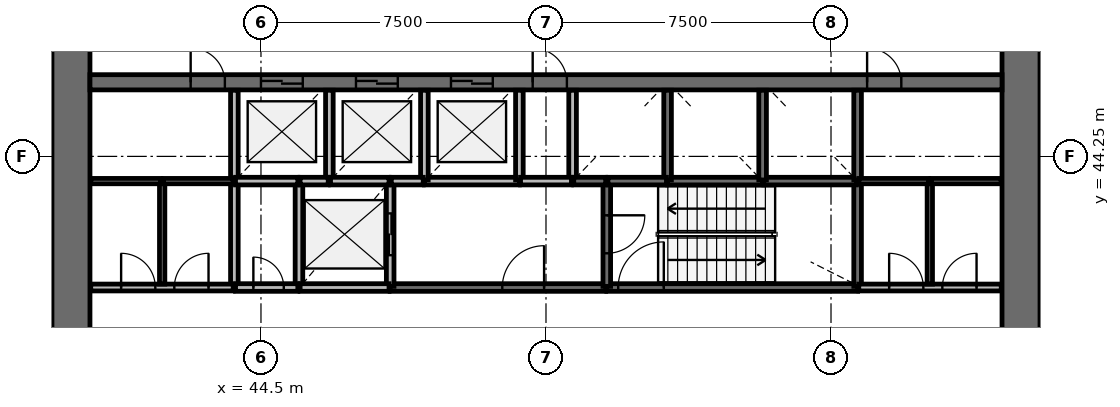
"""IFC4 building model, lengths in metres.
Left out: names, types, materials, properties, quantities, classifications, styles, units other than length and angle.
Written with IfcOpenShell. Run it as: python <this file> out.ifc"""

import sys

from ifc_helpers import new_model, si_unit, direction, frame, frame_2d, origin, place, context, subcontext, project, spatial, rectangle, extrude, source, transform, mapped, element, fill, save


model = new_model("IFC4")
c1 = context("Model", 3, precision=1e-05, world=origin(), true_north=direction((0.0, 1.0)))
c2 = subcontext(c1, "Body", "Model", "MODEL_VIEW")
j1 = project(units=[si_unit("LENGTHUNIT", "METRE"), si_unit("PLANEANGLEUNIT", "RADIAN")], contexts=[c1])
p1 = place(None, origin())
s1 = spatial("IfcSite", under=j1, at=p1, CompositionType="ELEMENT")
p2 = place(p1, origin())
s2 = spatial("IfcBuilding", under=s1, at=p2, CompositionType="ELEMENT")
p3 = place(p2, frame((0.0, 0.0, 13.8)))
s3 = spatial("IfcBuildingStorey", under=s2, at=p3, CompositionType="ELEMENT", Elevation=13.8)
p4 = place(p3, frame((64.5, 38.0, 0.0), z_axis=(0.0, 0.0, 1.0), x_axis=(0.0, 1.0, 0.0)))
e1 = element("IfcWall", 1, at=p4, inside=s3, PredefinedType="SHEAR", context=c2, shape_type="SweptSolid", body=[
    extrude(rectangle(XDim=20.0, YDim=1.0, at=frame_2d((10.0, 0.0))), origin(), (0.0, 0.0, 1.0), 4.4),
])
p5 = place(p4, frame((9.1, 0.0, 0.0)))
e2 = element("IfcOpeningElement", 2, at=p5, cuts=e1, PredefinedType="OPENING", context=c2, shape_type="SweptSolid", body=[
    extrude(rectangle(XDim=1.8, YDim=2.1, at=frame_2d((0.9, 1.05))), frame((0.0, 0.51, 0.0), z_axis=(0.0, -1.0, 0.0), x_axis=(1.0, 0.0, 0.0)), (0.0, 0.0, 1.0), 1.02),
])
p6 = place(p3, frame((39.5, 58.0, 0.0), z_axis=(0.0, 0.0, 1.0), x_axis=(0.0, -1.0, 0.0)))
e3 = element("IfcWall", 3, at=p6, inside=s3, PredefinedType="SHEAR", context=c2, shape_type="SweptSolid", body=[
    extrude(rectangle(XDim=20.0, YDim=1.0, at=frame_2d((10.0, 0.0))), origin(), (0.0, 0.0, 1.0), 4.4),
])
p7 = place(p6, frame((9.1, 0.0, 0.0)))
e4 = element("IfcOpeningElement", 4, at=p7, cuts=e3, PredefinedType="OPENING", context=c2, shape_type="SweptSolid", body=[
    extrude(rectangle(XDim=1.8, YDim=2.1, at=frame_2d((0.9, 1.05))), frame((0.0, 0.51, 0.0), z_axis=(0.0, -1.0, 0.0), x_axis=(1.0, 0.0, 0.0)), (0.0, 0.0, 1.0), 1.02),
])
p8 = place(p3, frame((40.0, 46.2, 0.0), z_axis=(0.0, 0.0, 1.0), x_axis=(1.0, 0.0, 0.0)))
e5 = element("IfcWall", 5, at=p8, inside=s3, PredefinedType="SHEAR", context=c2, shape_type="SweptSolid", body=[
    extrude(rectangle(XDim=24.0, YDim=0.4, at=frame_2d((12.0, 0.0))), origin(), (0.0, 0.0, 1.0), 4.4),
])
p9 = place(p8, frame((4.5, 0.0, 0.0)))
e6 = element("IfcOpeningElement", 6, at=p9, cuts=e5, PredefinedType="OPENING", context=c2, shape_type="SweptSolid", body=[
    extrude(rectangle(XDim=1.1, YDim=2.1, at=frame_2d((0.55, 1.05))), frame((0.0, 0.21, 0.0), z_axis=(0.0, -1.0, 0.0), x_axis=(1.0, 0.0, 0.0)), (0.0, 0.0, 1.0), 0.42),
])
p10 = place(p8, frame((7.0, 0.0, 0.0)))
e7 = element("IfcOpeningElement", 7, at=p10, cuts=e5, PredefinedType="OPENING", context=c2, shape_type="SweptSolid", body=[
    extrude(rectangle(XDim=1.1, YDim=2.1, at=frame_2d((0.55, 1.05))), frame((0.0, 0.21, 0.0), z_axis=(0.0, -1.0, 0.0), x_axis=(1.0, 0.0, 0.0)), (0.0, 0.0, 1.0), 0.42),
])
p11 = place(p8, frame((9.5, 0.0, 0.0)))
e8 = element("IfcOpeningElement", 8, at=p11, cuts=e5, PredefinedType="OPENING", context=c2, shape_type="SweptSolid", body=[
    extrude(rectangle(XDim=1.1, YDim=2.1, at=frame_2d((0.55, 1.05))), frame((0.0, 0.21, 0.0), z_axis=(0.0, -1.0, 0.0), x_axis=(1.0, 0.0, 0.0)), (0.0, 0.0, 1.0), 0.42),
])
p12 = place(p8, frame((20.45, 0.0, 0.0)))
e9 = element("IfcOpeningElement", 9, at=p12, cuts=e5, PredefinedType="OPENING", context=c2, shape_type="SweptSolid", body=[
    extrude(rectangle(XDim=0.9, YDim=2.1, at=frame_2d((0.45, 1.05))), frame((0.0, 0.21, 0.0), z_axis=(0.0, -1.0, 0.0), x_axis=(1.0, 0.0, 0.0)), (0.0, 0.0, 1.0), 0.42),
])
p13 = place(p8, frame((2.65, 0.0, 0.0)))
e10 = element("IfcOpeningElement", 10, at=p13, cuts=e5, PredefinedType="OPENING", context=c2, shape_type="SweptSolid", body=[
    extrude(rectangle(XDim=0.9, YDim=2.1, at=frame_2d((0.45, 1.05))), frame((0.0, 0.21, 0.0), z_axis=(0.0, -1.0, 0.0), x_axis=(1.0, 0.0, 0.0)), (0.0, 0.0, 1.0), 0.42),
])
p14 = place(p8, frame((11.65, 0.0, 0.0)))
e11 = element("IfcOpeningElement", 11, at=p14, cuts=e5, PredefinedType="OPENING", context=c2, shape_type="SweptSolid", body=[
    extrude(rectangle(XDim=0.9, YDim=2.1, at=frame_2d((0.45, 1.05))), frame((0.0, 0.21, 0.0), z_axis=(0.0, -1.0, 0.0), x_axis=(1.0, 0.0, 0.0)), (0.0, 0.0, 1.0), 0.42),
])
p15 = place(p3, frame((53.6, 40.8, 0.0), z_axis=(0.0, 0.0, 1.0), x_axis=(1.0, 0.0, 0.0)))
e12 = element("IfcWall", 12, at=p15, inside=s3, PredefinedType="SOLIDWALL", context=c2, shape_type="SweptSolid", body=[
    extrude(rectangle(XDim=6.6, YDim=0.2, at=frame_2d((3.3, 0.0))), origin(), (0.0, 0.0, 1.0), 4.05),
])
p16 = place(p15, frame((0.3, 0.0, 0.0)))
e13 = element("IfcOpeningElement", 13, at=p16, cuts=e12, PredefinedType="OPENING", context=c2, shape_type="SweptSolid", body=[
    extrude(rectangle(XDim=1.2, YDim=2.1, at=frame_2d((0.6, 1.05))), frame((0.0, 0.11, 0.0), z_axis=(0.0, -1.0, 0.0), x_axis=(1.0, 0.0, 0.0)), (0.0, 0.0, 1.0), 0.22),
])
p17 = place(p3, frame((47.9, 40.8, 0.0), z_axis=(0.0, 0.0, 1.0), x_axis=(1.0, 0.0, 0.0)))
e14 = element("IfcWall", 14, at=p17, inside=s3, PredefinedType="SOLIDWALL", context=c2, shape_type="SweptSolid", body=[
    extrude(rectangle(XDim=5.67, YDim=0.2, at=frame_2d((2.835, 0.0))), origin(), (0.0, 0.0, 1.0), 4.05),
])
p18 = place(p17, frame((2.95, 0.0, 0.0)))
e15 = element("IfcOpeningElement", 15, at=p18, cuts=e14, PredefinedType="OPENING", context=c2, shape_type="SweptSolid", body=[
    extrude(rectangle(XDim=1.1, YDim=2.1, at=frame_2d((0.55, 1.05))), frame((0.0, 0.11, 0.0), z_axis=(0.0, -1.0, 0.0), x_axis=(1.0, 0.0, 0.0)), (0.0, 0.0, 1.0), 0.22),
])
for number, where, z_axis, x_axis in (
    (16, (43.8, 43.6, 0.0), (0.0, 0.0, 1.0), (0.0, -1.0, 0.0)),
    (17, (45.5, 43.6, 0.0), (0.0, 0.0, 1.0), (0.0, -1.0, 0.0)),
):
    element("IfcWall", number, at=place(p3, frame(where, z_axis=z_axis, x_axis=x_axis)), inside=s3, PredefinedType="SOLIDWALL", context=c2, shape_type="SweptSolid", body=[
        extrude(rectangle(XDim=2.8, YDim=0.2, at=frame_2d((1.4, 0.0))), origin(), (0.0, 0.0, 1.0), 4.05),
    ])
p19 = place(p3, frame((47.9, 40.83, 0.0), z_axis=(0.0, 0.0, 1.0), x_axis=(0.0, 1.0, 0.0)))
e18 = element("IfcWall", 18, at=p19, inside=s3, PredefinedType="SOLIDWALL", context=c2, shape_type="SweptSolid", body=[
    extrude(rectangle(XDim=2.77, YDim=0.2, at=frame_2d((1.385, 0.0))), origin(), (0.0, 0.0, 1.0), 4.05),
])
p20 = place(p19, frame((0.82, 0.0, 0.0)))
e19 = element("IfcOpeningElement", 19, at=p20, cuts=e18, PredefinedType="OPENING", context=c2, shape_type="SweptSolid", body=[
    extrude(rectangle(XDim=1.1, YDim=2.1, at=frame_2d((0.55, 1.05))), frame((0.0, 0.11, 0.0), z_axis=(0.0, -1.0, 0.0), x_axis=(1.0, 0.0, 0.0)), (0.0, 0.0, 1.0), 0.22),
])
p21 = place(p3, frame((60.2, 40.83, 0.0), z_axis=(0.0, 0.0, 1.0), x_axis=(0.0, 1.0, 0.0)))
e20 = element("IfcWall", 20, at=p21, inside=s3, PredefinedType="SOLIDWALL", context=c2, shape_type="SweptSolid", body=[
    extrude(rectangle(XDim=2.77, YDim=0.2, at=frame_2d((1.385, 0.0))), origin(), (0.0, 0.0, 1.0), 4.05),
])
p22 = place(p3, frame((53.6, 43.6, 0.0), z_axis=(0.0, 0.0, 1.0), x_axis=(0.0, -1.0, 0.0)))
e21 = element("IfcWall", 21, at=p22, inside=s3, PredefinedType="SOLIDWALL", context=c2, shape_type="SweptSolid", body=[
    extrude(rectangle(XDim=2.77, YDim=0.2, at=frame_2d((1.385, 0.0))), origin(), (0.0, 0.0, 1.0), 4.05),
])
p23 = place(p22, frame((0.9, 0.0, 0.0)))
e22 = element("IfcOpeningElement", 22, at=p23, cuts=e21, PredefinedType="OPENING", context=c2, shape_type="SweptSolid", body=[
    extrude(rectangle(XDim=1.0, YDim=2.1, at=frame_2d((0.5, 1.05))), frame((0.0, 0.11, 0.0), z_axis=(0.0, -1.0, 0.0), x_axis=(1.0, 0.0, 0.0)), (0.0, 0.0, 1.0), 0.22),
])
for number, where, z_axis, x_axis in (
    (23, (48.8, 43.6, 0.0), (0.0, 0.0, 1.0), (1.0, 0.0, 0.0)),
    (24, (55.2, 43.6, 0.0), (0.0, 0.0, 1.0), (1.0, 0.0, 0.0)),
):
    element("IfcWall", number, at=place(p3, frame(where, z_axis=z_axis, x_axis=x_axis)), inside=s3, PredefinedType="SOLIDWALL", context=c2, shape_type="SweptSolid", body=[
        extrude(rectangle(XDim=2.5, YDim=0.2, at=frame_2d((1.25, 0.0))), origin(), (0.0, 0.0, 1.0), 4.05),
    ])
p24 = place(p3, frame((57.73, 43.6, 0.0), z_axis=(0.0, 0.0, 1.0), x_axis=(1.0, 0.0, 0.0)))
e25 = element("IfcWall", 25, at=p24, inside=s3, PredefinedType="SOLIDWALL", context=c2, shape_type="SweptSolid", body=[
    extrude(rectangle(XDim=2.44, YDim=0.2, at=frame_2d((1.22, 0.0))), origin(), (0.0, 0.0, 1.0), 4.05),
])
p25 = place(p3, frame((45.53, 40.8, 0.0), z_axis=(0.0, 0.0, 1.0), x_axis=(1.0, 0.0, 0.0)))
e26 = element("IfcWall", 26, at=p25, inside=s3, PredefinedType="SOLIDWALL", context=c2, shape_type="SweptSolid", body=[
    extrude(rectangle(XDim=2.34, YDim=0.2, at=frame_2d((1.17, 0.0))), origin(), (0.0, 0.0, 1.0), 4.05),
])
p26 = place(p3, frame((43.8, 45.99, 0.0), z_axis=(0.0, 0.0, 1.0), x_axis=(0.0, -1.0, 0.0)))
e27 = element("IfcWall", 27, at=p26, inside=s3, PredefinedType="SOLIDWALL", context=c2, shape_type="SweptSolid", body=[
    extrude(rectangle(XDim=2.36, YDim=0.2, at=frame_2d((1.18, 0.0))), origin(), (0.0, 0.0, 1.0), 4.05),
])
p27 = place(p3, frame((46.3, 43.6, 0.0), z_axis=(0.0, 0.0, 1.0), x_axis=(0.0, 1.0, 0.0)))
e28 = element("IfcWall", 28, at=p27, inside=s3, PredefinedType="SOLIDWALL", context=c2, shape_type="SweptSolid", body=[
    extrude(rectangle(XDim=2.39, YDim=0.2, at=frame_2d((1.195, 0.0))), origin(), (0.0, 0.0, 1.0), 4.05),
])
for number, where, z_axis, x_axis in (
    (29, (48.8, 43.63, 0.0), (0.0, 0.0, 1.0), (0.0, 1.0, 0.0)),
    (30, (51.3, 43.63, 0.0), (0.0, 0.0, 1.0), (0.0, 1.0, 0.0)),
):
    element("IfcWall", number, at=place(p3, frame(where, z_axis=z_axis, x_axis=x_axis)), inside=s3, PredefinedType="SOLIDWALL", context=c2, shape_type="SweptSolid", body=[
        extrude(rectangle(XDim=2.36, YDim=0.2, at=frame_2d((1.18, 0.0))), origin(), (0.0, 0.0, 1.0), 4.05),
    ])
p28 = place(p3, frame((52.7, 45.99, 0.0), z_axis=(0.0, 0.0, 1.0), x_axis=(0.0, -1.0, 0.0)))
e31 = element("IfcWall", 31, at=p28, inside=s3, PredefinedType="SOLIDWALL", context=c2, shape_type="SweptSolid", body=[
    extrude(rectangle(XDim=2.39, YDim=0.2, at=frame_2d((1.195, 0.0))), origin(), (0.0, 0.0, 1.0), 4.05),
])
for number, where, z_axis, x_axis in (
    (32, (55.2, 43.63, 0.0), (0.0, 0.0, 1.0), (0.0, 1.0, 0.0)),
    (33, (57.7, 43.63, 0.0), (0.0, 0.0, 1.0), (0.0, 1.0, 0.0)),
    (34, (60.2, 43.63, 0.0), (0.0, 0.0, 1.0), (0.0, 1.0, 0.0)),
):
    element("IfcWall", number, at=place(p3, frame(where, z_axis=z_axis, x_axis=x_axis)), inside=s3, PredefinedType="SOLIDWALL", context=c2, shape_type="SweptSolid", body=[
        extrude(rectangle(XDim=2.36, YDim=0.2, at=frame_2d((1.18, 0.0))), origin(), (0.0, 0.0, 1.0), 4.05),
    ])
p29 = place(p3, frame((43.83, 43.6, 0.0), z_axis=(0.0, 0.0, 1.0), x_axis=(1.0, 0.0, 0.0)))
e35 = element("IfcWall", 35, at=p29, inside=s3, PredefinedType="SOLIDWALL", context=c2, shape_type="SweptSolid", body=[
    extrude(rectangle(XDim=1.64, YDim=0.2, at=frame_2d((0.82, 0.0))), origin(), (0.0, 0.0, 1.0), 4.05),
])
p30 = place(p3, frame((43.83, 40.8, 0.0), z_axis=(0.0, 0.0, 1.0), x_axis=(1.0, 0.0, 0.0)))
e36 = element("IfcWall", 36, at=p30, inside=s3, PredefinedType="SOLIDWALL", context=c2, shape_type="SweptSolid", body=[
    extrude(rectangle(XDim=1.64, YDim=0.2, at=frame_2d((0.82, 0.0))), origin(), (0.0, 0.0, 1.0), 4.05),
])
p31 = place(p30, frame((0.47, 0.0, 0.0)))
e37 = element("IfcOpeningElement", 37, at=p31, cuts=e36, PredefinedType="OPENING", context=c2, shape_type="SweptSolid", body=[
    extrude(rectangle(XDim=0.8, YDim=2.1, at=frame_2d((0.4, 1.05))), frame((0.0, 0.11, 0.0), z_axis=(0.0, -1.0, 0.0), x_axis=(1.0, 0.0, 0.0)), (0.0, 0.0, 1.0), 0.22),
])
for number, where, z_axis, x_axis in (
    (38, (46.33, 43.6, 0.0), (0.0, 0.0, 1.0), (1.0, 0.0, 0.0)),
    (39, (53.63, 43.6, 0.0), (0.0, 0.0, 1.0), (1.0, 0.0, 0.0)),
):
    element("IfcWall", number, at=place(p3, frame(where, z_axis=z_axis, x_axis=x_axis)), inside=s3, PredefinedType="SOLIDWALL", context=c2, shape_type="SweptSolid", body=[
        extrude(rectangle(XDim=1.54, YDim=0.2, at=frame_2d((0.77, 0.0))), origin(), (0.0, 0.0, 1.0), 4.05),
    ])
p32 = place(p3, frame((52.67, 43.6, 0.0), z_axis=(0.0, 0.0, 1.0), x_axis=(-1.0, 0.0, 0.0)))
e40 = element("IfcWall", 40, at=p32, inside=s3, PredefinedType="SOLIDWALL", context=c2, shape_type="SweptSolid", body=[
    extrude(rectangle(XDim=1.34, YDim=0.2, at=frame_2d((0.67, 0.0))), origin(), (0.0, 0.0, 1.0), 4.05),
])
for number, where, z_axis, x_axis in (
    (41, (47.93, 43.6, 0.0), (0.0, 0.0, 1.0), (1.0, 0.0, 0.0)),
    (42, (52.73, 43.6, 0.0), (0.0, 0.0, 1.0), (1.0, 0.0, 0.0)),
):
    element("IfcWall", number, at=place(p3, frame(where, z_axis=z_axis, x_axis=x_axis)), inside=s3, PredefinedType="SOLIDWALL", context=c2, shape_type="SweptSolid", body=[
        extrude(rectangle(XDim=0.84, YDim=0.2, at=frame_2d((0.42, 0.0))), origin(), (0.0, 0.0, 1.0), 4.05),
    ])
p33 = place(p3, frame((45.53, 43.6, 0.0), z_axis=(0.0, 0.0, 1.0), x_axis=(1.0, 0.0, 0.0)))
e43 = element("IfcWall", 43, at=p33, inside=s3, PredefinedType="SOLIDWALL", context=c2, shape_type="SweptSolid", body=[
    extrude(rectangle(XDim=0.74, YDim=0.2, at=frame_2d((0.37, 0.0))), origin(), (0.0, 0.0, 1.0), 4.05),
])
p34 = place(p3, frame((40.02, 40.8, 0.0), z_axis=(0.0, 0.0, 1.0), x_axis=(1.0, 0.0, 0.0)))
e44 = element("IfcWall", 44, at=p34, inside=s3, PredefinedType="PARTITIONING", context=c2, shape_type="SweptSolid", body=[
    extrude(rectangle(XDim=3.75, YDim=0.18, at=frame_2d((1.875, 0.0))), origin(), (0.0, 0.0, 1.0), 4.05),
])
p35 = place(p34, frame((0.8, 0.0, 0.0)))
e45 = element("IfcOpeningElement", 45, at=p35, cuts=e44, PredefinedType="OPENING", context=c2, shape_type="SweptSolid", body=[
    extrude(rectangle(XDim=0.9, YDim=2.1, at=frame_2d((0.45, 1.05))), frame((0.0, 0.1, 0.0), z_axis=(0.0, -1.0, 0.0), x_axis=(1.0, 0.0, 0.0)), (0.0, 0.0, 1.0), 0.2),
])
p36 = place(p34, frame((2.2, 0.0, 0.0)))
e46 = element("IfcOpeningElement", 46, at=p36, cuts=e44, PredefinedType="OPENING", context=c2, shape_type="SweptSolid", body=[
    extrude(rectangle(XDim=0.9, YDim=2.1, at=frame_2d((0.45, 1.05))), frame((0.0, 0.1, 0.0), z_axis=(0.0, -1.0, 0.0), x_axis=(1.0, 0.0, 0.0)), (0.0, 0.0, 1.0), 0.2),
])
p37 = place(p3, frame((60.23, 40.8, 0.0), z_axis=(0.0, 0.0, 1.0), x_axis=(1.0, 0.0, 0.0)))
e47 = element("IfcWall", 47, at=p37, inside=s3, PredefinedType="PARTITIONING", context=c2, shape_type="SweptSolid", body=[
    extrude(rectangle(XDim=3.75, YDim=0.18, at=frame_2d((1.875, 0.0))), origin(), (0.0, 0.0, 1.0), 4.05),
])
p38 = place(p37, frame((0.8, 0.0, 0.0)))
e48 = element("IfcOpeningElement", 48, at=p38, cuts=e47, PredefinedType="OPENING", context=c2, shape_type="SweptSolid", body=[
    extrude(rectangle(XDim=0.9, YDim=2.1, at=frame_2d((0.45, 1.05))), frame((0.0, 0.1, 0.0), z_axis=(0.0, -1.0, 0.0), x_axis=(1.0, 0.0, 0.0)), (0.0, 0.0, 1.0), 0.2),
])
p39 = place(p37, frame((2.2, 0.0, 0.0)))
e49 = element("IfcOpeningElement", 49, at=p39, cuts=e47, PredefinedType="OPENING", context=c2, shape_type="SweptSolid", body=[
    extrude(rectangle(XDim=0.9, YDim=2.1, at=frame_2d((0.45, 1.05))), frame((0.0, 0.1, 0.0), z_axis=(0.0, -1.0, 0.0), x_axis=(1.0, 0.0, 0.0)), (0.0, 0.0, 1.0), 0.2),
])
for number, where, z_axis, x_axis in (
    (50, (41.9, 40.89, 0.0), (0.0, 0.0, 1.0), (0.0, 1.0, 0.0)),
    (51, (62.1, 40.89, 0.0), (0.0, 0.0, 1.0), (0.0, 1.0, 0.0)),
):
    element("IfcWall", number, at=place(p3, frame(where, z_axis=z_axis, x_axis=x_axis)), inside=s3, PredefinedType="PARTITIONING", context=c2, shape_type="SweptSolid", body=[
        extrude(rectangle(XDim=2.71, YDim=0.14, at=frame_2d((1.355, 0.0))), origin(), (0.0, 0.0, 1.0), 3.25),
    ])
for number, where, z_axis, x_axis in (
    (52, (43.77, 43.6, 0.0), (0.0, 0.0, 1.0), (-1.0, 0.0, 0.0)),
    (53, (60.23, 43.6, 0.0), (0.0, 0.0, 1.0), (1.0, 0.0, 0.0)),
):
    element("IfcWall", number, at=place(p3, frame(where, z_axis=z_axis, x_axis=x_axis)), inside=s3, PredefinedType="PARTITIONING", context=c2, shape_type="SweptSolid", body=[
        extrude(rectangle(XDim=1.84, YDim=0.14, at=frame_2d((0.92, 0.0))), origin(), (0.0, 0.0, 1.0), 3.25),
    ])
for number, where, z_axis, x_axis in (
    (54, (41.87, 43.6, 0.0), (0.0, 0.0, 1.0), (-1.0, 0.0, 0.0)),
    (55, (62.13, 43.6, 0.0), (0.0, 0.0, 1.0), (1.0, 0.0, 0.0)),
):
    element("IfcWall", number, at=place(p3, frame(where, z_axis=z_axis, x_axis=x_axis)), inside=s3, PredefinedType="PARTITIONING", context=c2, shape_type="SweptSolid", body=[
        extrude(rectangle(XDim=1.85, YDim=0.14, at=frame_2d((0.925, 0.0))), origin(), (0.0, 0.0, 1.0), 3.25),
    ])
m1 = source(origin(), c2, "Body", "SweptSolid", [
    extrude(rectangle(XDim=1.1, YDim=2.1, at=frame_2d((0.55, 1.05))), frame((0.0, 0.025, 0.0), z_axis=(0.0, -1.0, 0.0), x_axis=(1.0, 0.0, 0.0)), (0.0, 0.0, 1.0), 0.05),
])
p40 = place(p9, origin())
e56 = element("IfcDoor", 56, at=p40, inside=s3, OperationType="DOUBLE_DOOR_SLIDING", PredefinedType="USERDEFINED", context=c2, shape_type="MappedRepresentation", body=[
    mapped(m1, transform((0.0, 0.0, 0.0), scale=1.0)),
])
fill(e6, e56)
p41 = place(p10, origin())
e57 = element("IfcDoor", 57, at=p41, inside=s3, OperationType="DOUBLE_DOOR_SLIDING", PredefinedType="USERDEFINED", context=c2, shape_type="MappedRepresentation", body=[
    mapped(m1, transform((0.0, 0.0, 0.0), scale=1.0)),
])
fill(e7, e57)
p42 = place(p11, origin())
e58 = element("IfcDoor", 58, at=p42, inside=s3, OperationType="DOUBLE_DOOR_SLIDING", PredefinedType="USERDEFINED", context=c2, shape_type="MappedRepresentation", body=[
    mapped(m1, transform((0.0, 0.0, 0.0), scale=1.0)),
])
fill(e8, e58)
p43 = place(p20, origin())
e59 = element("IfcDoor", 59, at=p43, inside=s3, OperationType="DOUBLE_DOOR_SLIDING", PredefinedType="USERDEFINED", context=c2, shape_type="MappedRepresentation", body=[
    mapped(m1, transform((0.0, 0.0, 0.0), scale=1.0)),
])
fill(e19, e59)
m2 = source(origin(), c2, "Body", "SweptSolid", [
    extrude(rectangle(XDim=1.2, YDim=2.1, at=frame_2d((0.6, 1.05))), frame((0.0, 0.025, 0.0), z_axis=(0.0, -1.0, 0.0), x_axis=(1.0, 0.0, 0.0)), (0.0, 0.0, 1.0), 0.05),
])
p44 = place(p16, origin())
e60 = element("IfcDoor", 60, at=p44, inside=s3, OperationType="SINGLE_SWING_RIGHT", PredefinedType="DOOR", context=c2, shape_type="MappedRepresentation", body=[
    mapped(m2, transform((0.0, 0.0, 0.0), scale=1.0)),
])
fill(e13, e60)
m3 = source(origin(), c2, "Body", "SweptSolid", [
    extrude(rectangle(XDim=1.0, YDim=2.1, at=frame_2d((0.5, 1.05))), frame((0.0, 0.025, 0.0), z_axis=(0.0, -1.0, 0.0), x_axis=(1.0, 0.0, 0.0)), (0.0, 0.0, 1.0), 0.05),
])
p45 = place(p23, origin())
e61 = element("IfcDoor", 61, at=p45, inside=s3, OperationType="SINGLE_SWING_LEFT", PredefinedType="DOOR", context=c2, shape_type="MappedRepresentation", body=[
    mapped(m3, transform((0.0, 0.0, 0.0), scale=1.0)),
])
fill(e22, e61)
m4 = source(origin(), c2, "Body", "SweptSolid", [
    extrude(rectangle(XDim=1.1, YDim=2.1, at=frame_2d((0.55, 1.05))), frame((0.0, 0.025, 0.0), z_axis=(0.0, -1.0, 0.0), x_axis=(1.0, 0.0, 0.0)), (0.0, 0.0, 1.0), 0.05),
])
p46 = place(p18, origin())
e62 = element("IfcDoor", 62, at=p46, inside=s3, OperationType="SINGLE_SWING_RIGHT", PredefinedType="DOOR", context=c2, shape_type="MappedRepresentation", body=[
    mapped(m4, transform((0.0, 0.0, 0.0), scale=1.0)),
])
fill(e15, e62)
m5 = source(origin(), c2, "Body", "SweptSolid", [
    extrude(rectangle(XDim=0.8, YDim=2.1, at=frame_2d((0.4, 1.05))), frame((0.0, 0.025, 0.0), z_axis=(0.0, -1.0, 0.0), x_axis=(1.0, 0.0, 0.0)), (0.0, 0.0, 1.0), 0.05),
])
p47 = place(p31, origin())
e63 = element("IfcDoor", 63, at=p47, inside=s3, OperationType="SINGLE_SWING_LEFT", PredefinedType="DOOR", context=c2, shape_type="MappedRepresentation", body=[
    mapped(m5, transform((0.0, 0.0, 0.0), scale=1.0)),
])
fill(e37, e63)
m6 = source(origin(), c2, "Body", "SweptSolid", [
    extrude(rectangle(XDim=0.9, YDim=2.1, at=frame_2d((0.45, 1.05))), frame((0.0, 0.025, 0.0), z_axis=(0.0, -1.0, 0.0), x_axis=(1.0, 0.0, 0.0)), (0.0, 0.0, 1.0), 0.05),
])
p48 = place(p35, origin())
e64 = element("IfcDoor", 64, at=p48, inside=s3, OperationType="SINGLE_SWING_LEFT", PredefinedType="DOOR", context=c2, shape_type="MappedRepresentation", body=[
    mapped(m6, transform((0.0, 0.0, 0.0), scale=1.0)),
])
fill(e45, e64)
p49 = place(p36, origin())
e65 = element("IfcDoor", 65, at=p49, inside=s3, OperationType="SINGLE_SWING_RIGHT", PredefinedType="DOOR", context=c2, shape_type="MappedRepresentation", body=[
    mapped(m6, transform((0.0, 0.0, 0.0), scale=1.0)),
])
fill(e46, e65)
p50 = place(p12, origin())
e66 = element("IfcDoor", 66, at=p50, inside=s3, OperationType="SINGLE_SWING_LEFT", PredefinedType="DOOR", context=c2, shape_type="MappedRepresentation", body=[
    mapped(m6, transform((0.0, 0.0, 0.0), scale=1.0)),
])
fill(e9, e66)
p51 = place(p38, origin())
e67 = element("IfcDoor", 67, at=p51, inside=s3, OperationType="SINGLE_SWING_LEFT", PredefinedType="DOOR", context=c2, shape_type="MappedRepresentation", body=[
    mapped(m6, transform((0.0, 0.0, 0.0), scale=1.0)),
])
fill(e48, e67)
p52 = place(p39, origin())
e68 = element("IfcDoor", 68, at=p52, inside=s3, OperationType="SINGLE_SWING_RIGHT", PredefinedType="DOOR", context=c2, shape_type="MappedRepresentation", body=[
    mapped(m6, transform((0.0, 0.0, 0.0), scale=1.0)),
])
fill(e49, e68)
p53 = place(p13, origin())
e69 = element("IfcDoor", 69, at=p53, inside=s3, OperationType="SINGLE_SWING_LEFT", PredefinedType="DOOR", context=c2, shape_type="MappedRepresentation", body=[
    mapped(m6, transform((0.0, 0.0, 0.0), scale=1.0)),
])
fill(e10, e69)
p54 = place(p14, origin())
e70 = element("IfcDoor", 70, at=p54, inside=s3, OperationType="SINGLE_SWING_LEFT", PredefinedType="DOOR", context=c2, shape_type="MappedRepresentation", body=[
    mapped(m6, transform((0.0, 0.0, 0.0), scale=1.0)),
])
fill(e11, e70)
save(model, sys.argv[1])
